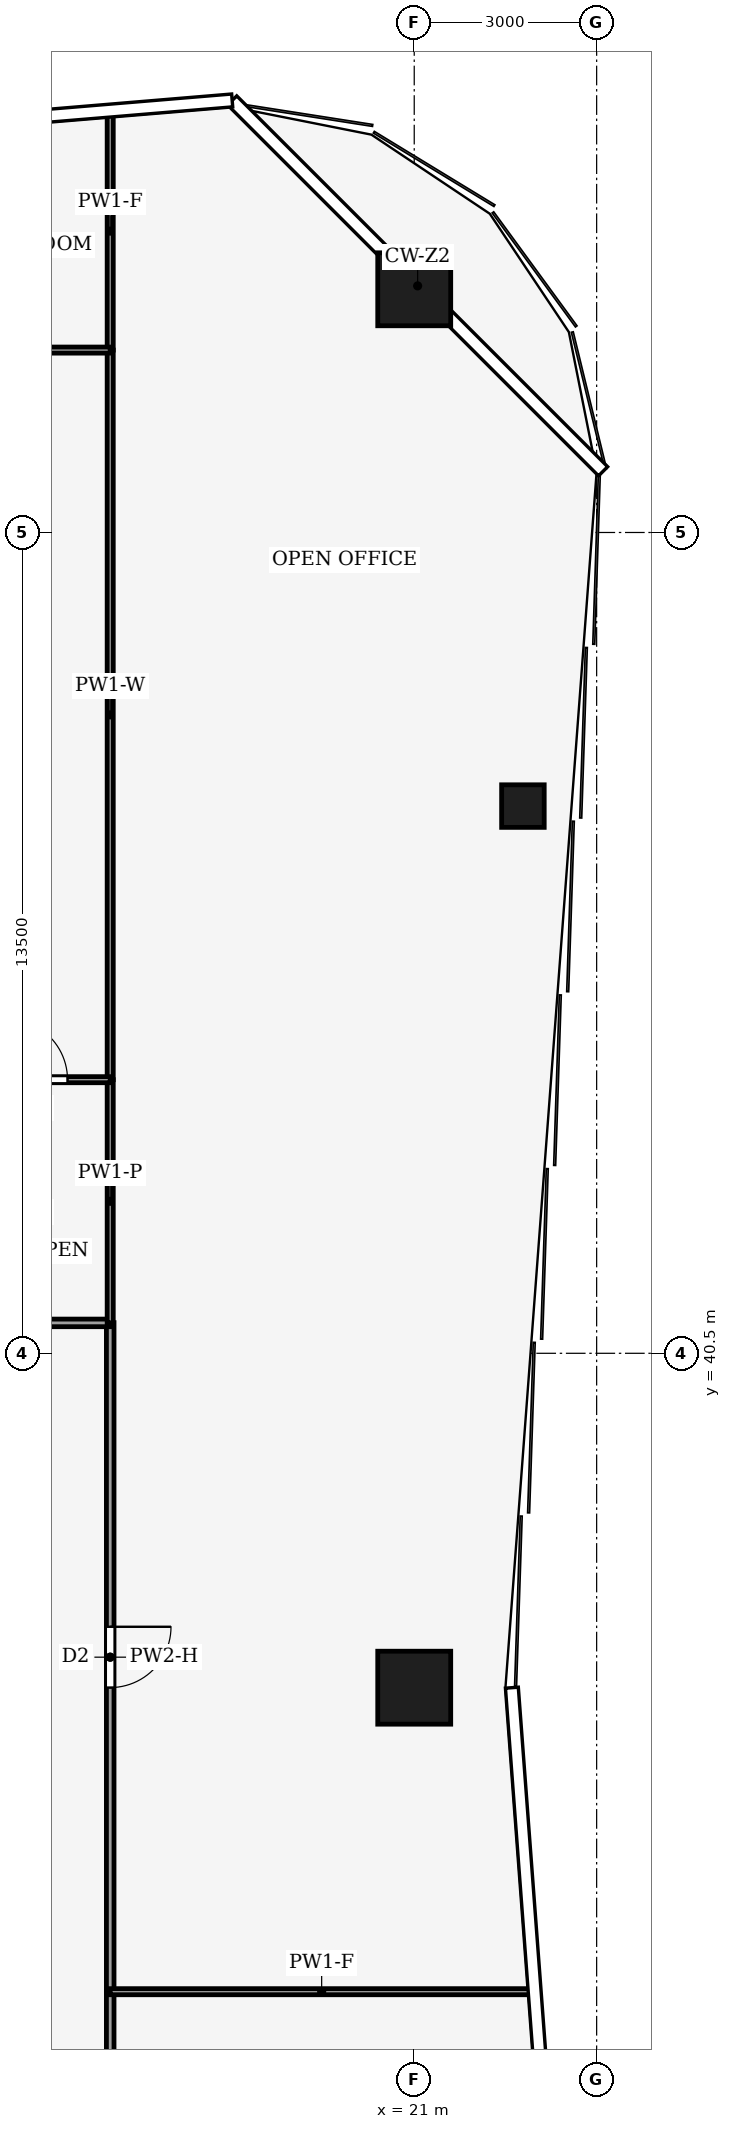
"""IFC4 building model, lengths in metres.
Left out: names, types, materials, properties, quantities, classifications, styles, units other than length and angle.
Written with IfcOpenShell. Run it as: python <this file> out.ifc"""

import sys

from ifc_helpers import new_model, si_unit, direction, frame, frame_2d, origin, origin_2d, place, context, subcontext, project, spatial, rectangle, hollow_rectangle, extrude, element, fill, save


model = new_model("IFC4")
c1 = context("Model", 3, precision=1e-05, world=origin(), true_north=direction((0.0, 1.0)))
c2 = subcontext(c1, "Body", "Model", "MODEL_VIEW")
j1 = project(units=[si_unit("LENGTHUNIT", "METRE"), si_unit("PLANEANGLEUNIT", "RADIAN")], contexts=[c1])
p1 = place(None, origin())
s1 = spatial("IfcSite", under=j1, at=p1, CompositionType="ELEMENT")
p2 = place(p1, origin())
s2 = spatial("IfcBuilding", under=s1, at=p2, CompositionType="ELEMENT")
p3 = place(p2, frame((0.0, 0.0, 142.0)))
s3 = spatial("IfcBuildingStorey", under=s2, at=p3, CompositionType="ELEMENT", Elevation=142.0)
for number, where, z_axis, x_axis in (
    (1, (21.0, 58.0, 0.0), (0.0, 0.0, 1.0), (1.0, 0.0, 0.0)),
    (2, (21.0, 35.0, 0.0), (0.0, 0.0, 1.0), (1.0, 0.0, 0.0)),
):
    element("IfcColumn", number, at=place(p3, frame(where, z_axis=z_axis, x_axis=x_axis)), inside=s3, PredefinedType="COLUMN", context=c2, shape_type="SweptSolid", body=[
        extrude(hollow_rectangle(XDim=1.2, YDim=1.2, WallThickness=0.07, at=origin_2d()), origin(), (0.0, 0.0, 1.0), 4.0),
    ])
p4 = place(p3, frame((22.788, 49.5, 0.0), z_axis=(0.0, 0.0, 1.0), x_axis=(1.0, 0.0, 0.0)))
e3 = element("IfcColumn", 3, at=p4, inside=s3, PredefinedType="COLUMN", context=c2, shape_type="SweptSolid", body=[
    extrude(hollow_rectangle(XDim=0.7, YDim=0.7, WallThickness=0.03, at=origin_2d()), origin(), (0.0, 0.0, 1.0), 4.0),
])
p5 = place(p3, frame((16.0, 30.0, 0.0), z_axis=(0.0, 0.0, 1.0), x_axis=(0.0, -1.0, 0.0)))
e4 = element("IfcWall", 4, at=p5, inside=s3, PredefinedType="PARTITIONING", context=c2, shape_type="SweptSolid", body=[
    extrude(rectangle(XDim=3.0, YDim=0.125, at=frame_2d((1.5, 0.0))), origin(), (0.0, 0.0, 1.0), 3.48),
])
p6 = place(p5, frame((1.05, 0.0, 0.0)))
e5 = element("IfcOpeningElement", 5, at=p6, cuts=e4, PredefinedType="OPENING", context=c2, shape_type="SweptSolid", body=[
    extrude(rectangle(XDim=0.9, YDim=2.1, at=frame_2d((0.45, 1.05))), frame((0.0, 0.073, 0.0), z_axis=(0.0, -1.0, 0.0), x_axis=(1.0, 0.0, 0.0)), (0.0, 0.0, 1.0), 0.145),
])
p7 = place(p3, frame((16.0, 41.004, 0.0), z_axis=(0.0, 0.0, 1.0), x_axis=(0.0, -1.0, 0.0)))
e6 = element("IfcWall", 6, at=p7, inside=s3, PredefinedType="PARTITIONING", context=c2, shape_type="SweptSolid", body=[
    extrude(rectangle(XDim=11.004, YDim=0.125, at=frame_2d((5.502, 0.0))), origin(), (0.0, 0.0, 1.0), 3.14),
])
p8 = place(p7, frame((5.002, 0.0, 0.0)))
e7 = element("IfcOpeningElement", 7, at=p8, cuts=e6, PredefinedType="OPENING", context=c2, shape_type="SweptSolid", body=[
    extrude(rectangle(XDim=1.0, YDim=2.1, at=frame_2d((0.5, 1.05))), frame((0.0, 0.073, 0.0), z_axis=(0.0, -1.0, 0.0), x_axis=(1.0, 0.0, 0.0)), (0.0, 0.0, 1.0), 0.145),
])
p9 = place(p3, frame((12.0, 41.0, 0.0), z_axis=(0.0, 0.0, 1.0), x_axis=(1.0, 0.0, 0.0)))
e8 = element("IfcWall", 8, at=p9, inside=s3, PredefinedType="PARTITIONING", context=c2, shape_type="SweptSolid", body=[
    extrude(rectangle(XDim=4.0, YDim=0.125, at=frame_2d((2.0, 0.0))), origin(), (0.0, 0.0, 1.0), 3.44),
])
p10 = place(p9, frame((1.5, 0.0, 0.0)))
e9 = element("IfcOpeningElement", 9, at=p10, cuts=e8, PredefinedType="OPENING", context=c2, shape_type="SweptSolid", body=[
    extrude(rectangle(XDim=1.0, YDim=2.1, at=frame_2d((0.5, 1.05))), frame((0.0, 0.073, 0.0), z_axis=(0.0, -1.0, 0.0), x_axis=(1.0, 0.0, 0.0)), (0.0, 0.0, 1.0), 0.145),
])
p11 = place(p3, frame((22.955, 30.0, 0.0), z_axis=(0.0, 0.0, 1.0), x_axis=(-1.0, 0.0, 0.0)))
e10 = element("IfcWall", 10, at=p11, inside=s3, PredefinedType="PARTITIONING", context=c2, shape_type="SweptSolid", body=[
    extrude(rectangle(XDim=6.955, YDim=0.1, at=frame_2d((3.478, 0.0))), origin(), (0.0, 0.0, 1.0), 3.04),
])
p12 = place(p3, frame((16.0, 45.0, 0.0), z_axis=(0.0, 0.0, 1.0), x_axis=(0.0, -1.0, 0.0)))
e11 = element("IfcWall", 11, at=p12, inside=s3, PredefinedType="PARTITIONING", context=c2, shape_type="SweptSolid", body=[
    extrude(rectangle(XDim=4.0, YDim=0.1, at=frame_2d((2.0, 0.0))), origin(), (0.0, 0.0, 1.0), 3.44),
])
p13 = place(p3, frame((16.0, 57.0, 0.0), z_axis=(0.0, 0.0, 1.0), x_axis=(0.0, -1.0, 0.0)))
e12 = element("IfcWall", 12, at=p13, inside=s3, PredefinedType="PARTITIONING", context=c2, shape_type="SweptSolid", body=[
    extrude(rectangle(XDim=12.0, YDim=0.1, at=frame_2d((6.0, 0.0))), origin(), (0.0, 0.0, 1.0), 3.24),
])
p14 = place(p3, frame((16.0, 60.913, 0.0), z_axis=(0.0, 0.0, 1.0), x_axis=(0.0, -1.0, 0.0)))
e13 = element("IfcWall", 13, at=p14, inside=s3, PredefinedType="PARTITIONING", context=c2, shape_type="SweptSolid", body=[
    extrude(rectangle(XDim=3.913, YDim=0.1, at=frame_2d((1.957, 0.0))), origin(), (0.0, 0.0, 1.0), 3.04),
])
p15 = place(p3, frame((11.996, 45.0, 0.0), z_axis=(0.0, 0.0, 1.0), x_axis=(1.0, 0.0, 0.0)))
e14 = element("IfcWall", 14, at=p15, inside=s3, PredefinedType="PARTITIONING", context=c2, shape_type="SweptSolid", body=[
    extrude(rectangle(XDim=4.004, YDim=0.1, at=frame_2d((2.002, 0.0))), origin(), (0.0, 0.0, 1.0), 3.87),
])
p16 = place(p15, frame((2.302, 0.0, 0.0)))
e15 = element("IfcOpeningElement", 15, at=p16, cuts=e14, PredefinedType="OPENING", context=c2, shape_type="SweptSolid", body=[
    extrude(rectangle(XDim=1.0, YDim=2.1, at=frame_2d((0.5, 1.05))), frame((0.0, 0.06, 0.0), z_axis=(0.0, -1.0, 0.0), x_axis=(1.0, 0.0, 0.0)), (0.0, 0.0, 1.0), 0.12),
])
p17 = place(p3, frame((6.0, 57.0, 0.0), z_axis=(0.0, 0.0, 1.0), x_axis=(1.0, 0.0, 0.0)))
e16 = element("IfcWall", 16, at=p17, inside=s3, PredefinedType="PARTITIONING", context=c2, shape_type="SweptSolid", body=[
    extrude(rectangle(XDim=10.0, YDim=0.1, at=frame_2d((5.0, 0.0))), origin(), (0.0, 0.0, 1.0), 3.44),
])
p18 = place(p17, frame((2.5, 0.0, 0.0)))
e17 = element("IfcOpeningElement", 17, at=p18, cuts=e16, PredefinedType="OPENING", context=c2, shape_type="SweptSolid", body=[
    extrude(rectangle(XDim=1.0, YDim=2.1, at=frame_2d((0.5, 1.05))), frame((0.0, 0.06, 0.0), z_axis=(0.0, -1.0, 0.0), x_axis=(1.0, 0.0, 0.0)), (0.0, 0.0, 1.0), 0.12),
])
p19 = place(p8, origin())
e18 = element("IfcDoor", 18, at=p19, inside=s3, OperationType="SINGLE_SWING_RIGHT", PredefinedType="DOOR", context=c2, shape_type="SweptSolid", body=[
    extrude(rectangle(XDim=1.0, YDim=2.1, at=frame_2d((0.5, 1.05))), frame((0.0, 0.025, 0.0), z_axis=(0.0, -1.0, 0.0), x_axis=(1.0, 0.0, 0.0)), (0.0, 0.0, 1.0), 0.05),
])
fill(e7, e18)
p20 = place(p16, origin())
e19 = element("IfcDoor", 19, at=p20, inside=s3, OperationType="SINGLE_SWING_RIGHT", PredefinedType="DOOR", context=c2, shape_type="SweptSolid", body=[
    extrude(rectangle(XDim=1.0, YDim=2.1, at=frame_2d((0.5, 1.05))), frame((0.0, 0.025, 0.0), z_axis=(0.0, -1.0, 0.0), x_axis=(1.0, 0.0, 0.0)), (0.0, 0.0, 1.0), 0.05),
])
fill(e15, e19)
save(model, sys.argv[1])
